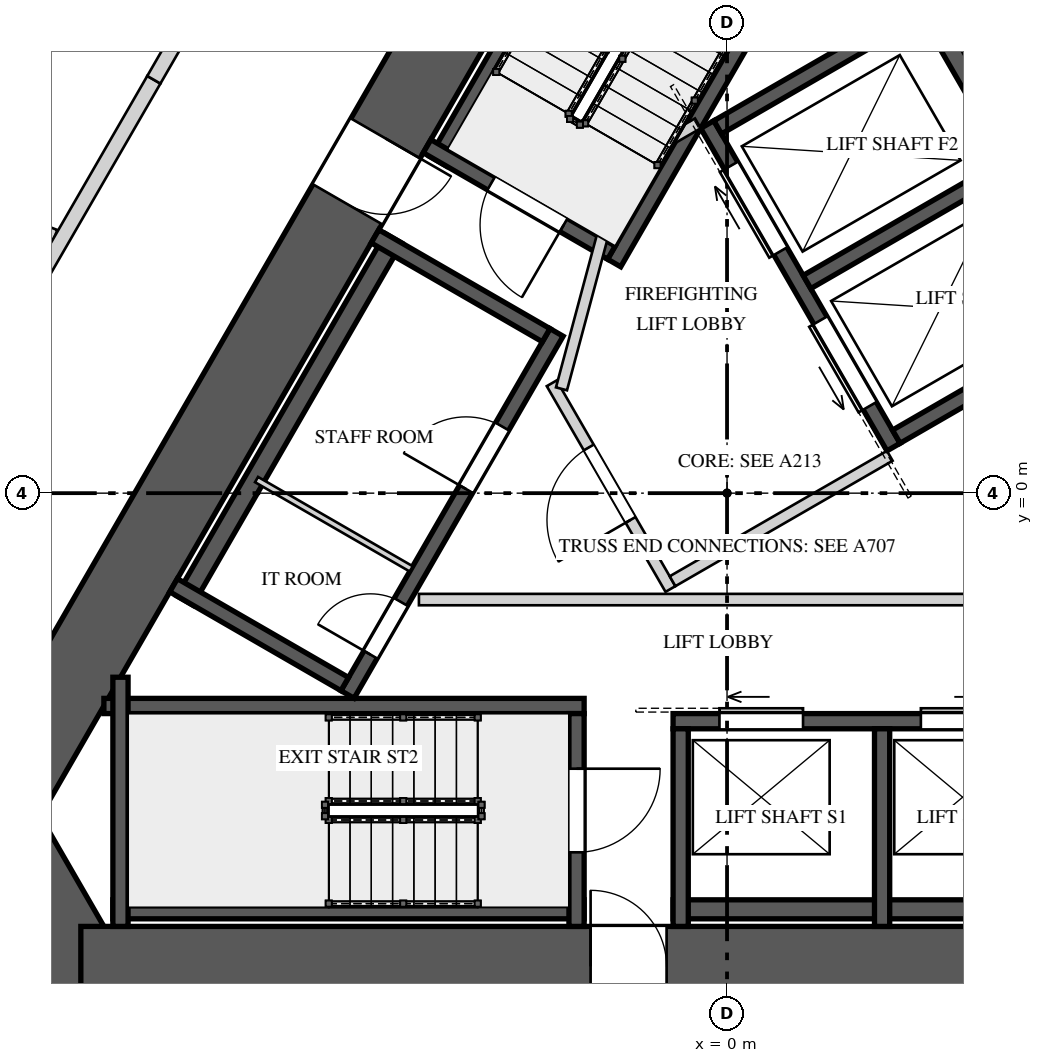
"""IFC4 building model, lengths in metres.
Left out: names, types, materials, properties, quantities, classifications, styles, units other than length and angle.
Written with IfcOpenShell. Run it as: python <this file> out.ifc"""

import sys

from ifc_helpers import new_model, si_unit, direction, frame, frame_2d, origin, place, context, subcontext, project, spatial, rectangle, extrude, element, fill, save


model = new_model("IFC4")
c1 = context("Model", 3, precision=1e-05, world=origin(), true_north=direction((0.0, 1.0)))
c2 = subcontext(c1, "Body", "Model", "MODEL_VIEW")
j1 = project(units=[si_unit("LENGTHUNIT", "METRE"), si_unit("PLANEANGLEUNIT", "RADIAN")], contexts=[c1])
p1 = place(None, origin())
s1 = spatial("IfcSite", under=j1, at=p1, CompositionType="ELEMENT")
p2 = place(p1, origin())
s2 = spatial("IfcBuilding", under=s1, at=p2, CompositionType="ELEMENT")
p3 = place(p2, frame((0.0, 0.0, 83.2)))
s3 = spatial("IfcBuildingStorey", under=s2, at=p3, CompositionType="ELEMENT", Elevation=83.2)
p4 = place(p3, frame((-1.14, 10.475, 0.0), z_axis=(0.0, 0.0, 1.0), x_axis=(-0.499985955615, -0.866033512162, 0.0)))
e1 = element("IfcWall", 1, at=p4, inside=s3, PredefinedType="SHEAR", context=c2, shape_type="SweptSolid", body=[
    extrude(rectangle(XDim=17.003, YDim=1.05, at=frame_2d((8.501, 0.0))), origin(), (0.0, 0.0, 1.0), 5.2),
])
p5 = place(p4, frame((6.707, 0.0, 0.0)))
e2 = element("IfcOpeningElement", 2, at=p5, cuts=e1, PredefinedType="OPENING", context=c2, shape_type="SweptSolid", body=[
    extrude(rectangle(XDim=1.0, YDim=2.4, at=frame_2d((0.5, 1.2))), frame((0.0, 0.535, 0.0), z_axis=(0.0, -1.0, 0.0), x_axis=(1.0, 0.0, 0.0)), (0.0, 0.0, 1.0), 1.07),
])
p6 = place(p3, frame((-9.793, -3.988, 0.0), z_axis=(0.0, 0.0, 1.0), x_axis=(0.499995765644, -0.866027848477, 0.0)))
e3 = element("IfcWall", 3, at=p6, inside=s3, PredefinedType="SHEAR", context=c2, shape_type="SweptSolid", body=[
    extrude(rectangle(XDim=2.887, YDim=1.05, at=frame_2d((1.443, 0.0))), origin(), (0.0, 0.0, 1.0), 5.2),
])
p7 = place(p3, frame((-8.501, -6.225, 0.0), z_axis=(0.0, 0.0, 1.0), x_axis=(1.0, 0.0, 0.0)))
e4 = element("IfcWall", 4, at=p7, inside=s3, PredefinedType="SHEAR", context=c2, shape_type="SweptSolid", body=[
    extrude(rectangle(XDim=17.003, YDim=1.05, at=frame_2d((8.501, 0.0))), origin(), (0.0, 0.0, 1.0), 5.2),
])
p8 = place(p7, frame((6.707, 0.0, 0.0)))
e5 = element("IfcOpeningElement", 5, at=p8, cuts=e4, PredefinedType="OPENING", context=c2, shape_type="SweptSolid", body=[
    extrude(rectangle(XDim=1.0, YDim=2.4, at=frame_2d((0.5, 1.2))), frame((0.0, 0.535, 0.0), z_axis=(0.0, -1.0, 0.0), x_axis=(1.0, 0.0, 0.0)), (0.0, 0.0, 1.0), 1.07),
])
p9 = place(p7, frame((14.472, 0.0, 0.0)))
e6 = element("IfcOpeningElement", 6, at=p9, cuts=e4, PredefinedType="OPENING", context=c2, shape_type="SweptSolid", body=[
    extrude(rectangle(XDim=0.8, YDim=2.1, at=frame_2d((0.4, 1.05))), frame((0.0, 0.535, 0.0), z_axis=(0.0, -1.0, 0.0), x_axis=(1.0, 0.0, 0.0)), (0.0, 0.0, 1.0), 1.07),
])
p10 = place(p3, frame((9.642, -4.25, 0.0), z_axis=(0.0, 0.0, 1.0), x_axis=(-0.499985955615, 0.866033512162, 0.0)))
e7 = element("IfcWall", 7, at=p10, inside=s3, PredefinedType="SHEAR", context=c2, shape_type="SweptSolid", body=[
    extrude(rectangle(XDim=17.003, YDim=1.05, at=frame_2d((8.501, 0.0))), origin(), (0.0, 0.0, 1.0), 5.2),
])
p11 = place(p10, frame((6.776, 0.0, 0.0)))
e8 = element("IfcOpeningElement", 8, at=p11, cuts=e7, PredefinedType="OPENING", context=c2, shape_type="SweptSolid", body=[
    extrude(rectangle(XDim=1.0, YDim=2.4, at=frame_2d((0.5, 1.2))), frame((0.0, 0.535, 0.0), z_axis=(0.0, -1.0, 0.0), x_axis=(1.0, 0.0, 0.0)), (0.0, 0.0, 1.0), 1.07),
])
p12 = place(p10, frame((13.967, 0.0, 0.0)))
e9 = element("IfcOpeningElement", 9, at=p12, cuts=e7, PredefinedType="OPENING", context=c2, shape_type="SweptSolid", body=[
    extrude(rectangle(XDim=0.8, YDim=2.1, at=frame_2d((0.4, 1.05))), frame((0.0, 0.535, 0.0), z_axis=(0.0, -1.0, 0.0), x_axis=(1.0, 0.0, 0.0)), (0.0, 0.0, 1.0), 1.07),
])
p13 = place(p3, frame((-0.701, 9.735, 0.0), z_axis=(0.0, 0.0, 1.0), x_axis=(-0.500026960575, -0.86600983753, 0.0)))
e10 = element("IfcWall", 10, at=p13, inside=s3, PredefinedType="SOLIDWALL", context=c2, shape_type="SweptSolid", body=[
    extrude(rectangle(XDim=6.2, YDim=0.25, at=frame_2d((3.1, 0.0))), origin(), (0.0, 0.0, 1.0), 4.85),
])
p14 = place(p3, frame((1.674, 8.5, 0.0), z_axis=(0.0, 0.0, 1.0), x_axis=(-0.499995607161, -0.866027939976, 0.0)))
e11 = element("IfcWall", 11, at=p14, inside=s3, PredefinedType="SOLIDWALL", context=c2, shape_type="SweptSolid", body=[
    extrude(rectangle(XDim=6.318, YDim=0.2, at=frame_2d((3.159, 0.0))), origin(), (0.0, 0.0, 1.0), 4.85),
])
p15 = place(p3, frame((-1.521, 3.165, 0.0), z_axis=(0.0, 0.0, 1.0), x_axis=(-0.866034573852, 0.49998411664, 0.0)))
e12 = element("IfcWall", 12, at=p15, inside=s3, PredefinedType="SOLIDWALL", context=c2, shape_type="SweptSolid", body=[
    extrude(rectangle(XDim=2.8, YDim=0.2, at=frame_2d((1.4, 0.0))), origin(), (0.0, 0.0, 1.0), 4.85),
])
p16 = place(p15, frame((0.725, 0.0, 0.0)))
e13 = element("IfcOpeningElement", 13, at=p16, cuts=e12, PredefinedType="OPENING", context=c2, shape_type="SweptSolid", body=[
    extrude(rectangle(XDim=1.1, YDim=2.4, at=frame_2d((0.55, 1.2))), frame((0.0, 0.11, 0.0), z_axis=(0.0, -1.0, 0.0), x_axis=(1.0, 0.0, 0.0)), (0.0, 0.0, 1.0), 0.22),
])
p17 = place(p3, frame((-8.08, -5.475, 0.0), z_axis=(0.0, 0.0, 1.0), x_axis=(1.0, 0.0, 0.0)))
e14 = element("IfcWall", 14, at=p17, inside=s3, PredefinedType="SOLIDWALL", context=c2, shape_type="SweptSolid", body=[
    extrude(rectangle(XDim=6.2, YDim=0.25, at=frame_2d((3.1, 0.0))), origin(), (0.0, 0.0, 1.0), 4.85),
])
p18 = place(p3, frame((-8.198, -2.8, 0.0), z_axis=(0.0, 0.0, 1.0), x_axis=(1.0, 0.0, 0.0)))
e15 = element("IfcWall", 15, at=p18, inside=s3, PredefinedType="SOLIDWALL", context=c2, shape_type="SweptSolid", body=[
    extrude(rectangle(XDim=6.319, YDim=0.2, at=frame_2d((3.159, 0.0))), origin(), (0.0, 0.0, 1.0), 4.85),
])
p19 = place(p3, frame((-7.98, -2.422, 0.0), z_axis=(0.0, 0.0, 1.0), x_axis=(0.0, -1.0, 0.0)))
e16 = element("IfcWall", 16, at=p19, inside=s3, PredefinedType="SOLIDWALL", context=c2, shape_type="SweptSolid", body=[
    extrude(rectangle(XDim=3.278, YDim=0.2, at=frame_2d((1.639, 0.0))), origin(), (0.0, 0.0, 1.0), 4.85),
])
p20 = place(p3, frame((-1.98, -2.9, 0.0), z_axis=(0.0, 0.0, 1.0), x_axis=(0.0, -1.0, 0.0)))
e17 = element("IfcWall", 17, at=p20, inside=s3, PredefinedType="SOLIDWALL", context=c2, shape_type="SweptSolid", body=[
    extrude(rectangle(XDim=2.8, YDim=0.2, at=frame_2d((1.4, 0.0))), origin(), (0.0, 0.0, 1.0), 4.85),
])
p21 = place(p20, frame((0.725, 0.0, 0.0)))
e18 = element("IfcOpeningElement", 18, at=p21, cuts=e17, PredefinedType="OPENING", context=c2, shape_type="SweptSolid", body=[
    extrude(rectangle(XDim=1.1, YDim=2.4, at=frame_2d((0.55, 1.2))), frame((0.0, 0.11, 0.0), z_axis=(0.0, -1.0, 0.0), x_axis=(1.0, 0.0, 0.0)), (0.0, 0.0, 1.0), 0.22),
])
p22 = place(p3, frame((-4.993, -2.648, 0.0), z_axis=(0.0, 0.0, 1.0), x_axis=(0.499996545922, 0.866027397988, 0.0)))
e19 = element("IfcWall", 19, at=p22, inside=s3, PredefinedType="SOLIDWALL", context=c2, shape_type="SweptSolid", body=[
    extrude(rectangle(XDim=5.5, YDim=0.2, at=frame_2d((2.75, 0.0))), origin(), (0.0, 0.0, 1.0), 4.85),
])
p23 = place(p22, frame((3.12, 0.0, 0.0)))
e20 = element("IfcOpeningElement", 20, at=p23, cuts=e19, PredefinedType="OPENING", context=c2, shape_type="SweptSolid", body=[
    extrude(rectangle(XDim=0.95, YDim=2.4, at=frame_2d((0.475, 1.2))), frame((0.0, 0.11, 0.0), z_axis=(0.0, -1.0, 0.0), x_axis=(1.0, 0.0, 0.0)), (0.0, 0.0, 1.0), 0.22),
])
p24 = place(p22, frame((0.605, 0.0, 0.0)))
e21 = element("IfcOpeningElement", 21, at=p24, cuts=e19, PredefinedType="OPENING", context=c2, shape_type="SweptSolid", body=[
    extrude(rectangle(XDim=0.8, YDim=2.1, at=frame_2d((0.4, 1.05))), frame((0.0, 0.11, 0.0), z_axis=(0.0, -1.0, 0.0), x_axis=(1.0, 0.0, 0.0)), (0.0, 0.0, 1.0), 0.22),
])
p25 = place(p3, frame((-4.386, 3.352, 0.0), z_axis=(0.0, 0.0, 1.0), x_axis=(-0.500015767406, -0.866016300277, 0.0)))
e22 = element("IfcWall", 22, at=p25, inside=s3, PredefinedType="SOLIDWALL", context=c2, shape_type="SweptSolid", body=[
    extrude(rectangle(XDim=5.5, YDim=0.25, at=frame_2d((2.75, 0.0))), origin(), (0.0, 0.0, 1.0), 4.85),
])
for number, where, z_axis, x_axis in (
    (23, (-2.38, 2.078, 0.0), (0.0, 0.0, 1.0), (-0.866, 0.5, 0.0)),
    (24, (-5.03, -2.512, 0.0), (0.0, 0.0, 1.0), (-0.866, 0.5, 0.0)),
):
    element("IfcWall", number, at=place(p3, frame(where, z_axis=z_axis, x_axis=x_axis)), inside=s3, PredefinedType="SOLIDWALL", context=c2, shape_type="SweptSolid", body=[
        extrude(rectangle(XDim=2.6, YDim=0.2, at=frame_2d((1.3, 0.0))), origin(), (0.0, 0.0, 1.0), 4.85),
    ])
p26 = place(p3, frame((-4.155, -0.996, 0.0), z_axis=(0.0, 0.0, 1.0), x_axis=(-0.866016039709, 0.500016218704, 0.0)))
e25 = element("IfcWall", 25, at=p26, inside=s3, PredefinedType="PARTITIONING", context=c2, shape_type="SweptSolid", body=[
    extrude(rectangle(XDim=2.35, YDim=0.08, at=frame_2d((1.175, 0.0))), origin(), (0.0, 0.0, 1.0), 4.85),
])
p27 = place(p3, frame((-0.71, -3.0, 0.0), z_axis=(0.0, 0.0, 1.0), x_axis=(1.0, 0.0, 0.0)))
e26 = element("IfcWall", 26, at=p27, inside=s3, PredefinedType="SOLIDWALL", context=c2, shape_type="SweptSolid", body=[
    extrude(rectangle(XDim=5.5, YDim=0.2, at=frame_2d((2.75, 0.0))), origin(), (0.0, 0.0, 1.0), 4.85),
])
p28 = place(p27, frame((0.61, 0.0, 0.0)))
e27 = element("IfcOpeningElement", 27, at=p28, cuts=e26, PredefinedType="OPENING", context=c2, shape_type="SweptSolid", body=[
    extrude(rectangle(XDim=1.1, YDim=2.1, at=frame_2d((0.55, 1.05))), frame((0.0, 0.11, 0.0), z_axis=(0.0, -1.0, 0.0), x_axis=(1.0, 0.0, 0.0)), (0.0, 0.0, 1.0), 0.22),
])
p29 = place(p27, frame((3.26, 0.0, 0.0)))
e28 = element("IfcOpeningElement", 28, at=p29, cuts=e26, PredefinedType="OPENING", context=c2, shape_type="SweptSolid", body=[
    extrude(rectangle(XDim=1.1, YDim=2.1, at=frame_2d((0.55, 1.05))), frame((0.0, 0.11, 0.0), z_axis=(0.0, -1.0, 0.0), x_axis=(1.0, 0.0, 0.0)), (0.0, 0.0, 1.0), 0.22),
])
p30 = place(p3, frame((-0.71, -5.475, 0.0), z_axis=(0.0, 0.0, 1.0), x_axis=(1.0, 0.0, 0.0)))
e29 = element("IfcWall", 29, at=p30, inside=s3, PredefinedType="SOLIDWALL", context=c2, shape_type="SweptSolid", body=[
    extrude(rectangle(XDim=5.5, YDim=0.25, at=frame_2d((2.75, 0.0))), origin(), (0.0, 0.0, 1.0), 4.85),
])
for number, where, z_axis, x_axis in (
    (30, (-0.61, -3.1, 0.0), (0.0, 0.0, 1.0), (0.0, -1.0, 0.0)),
    (31, (2.04, -3.1, 0.0), (0.0, 0.0, 1.0), (0.0, -1.0, 0.0)),
):
    element("IfcWall", number, at=place(p3, frame(where, z_axis=z_axis, x_axis=x_axis)), inside=s3, PredefinedType="SOLIDWALL", context=c2, shape_type="SweptSolid", body=[
        extrude(rectangle(XDim=2.6, YDim=0.2, at=frame_2d((1.3, 0.0))), origin(), (0.0, 0.0, 1.0), 4.85),
    ])
p31 = place(p3, frame((2.19, 0.606, 0.0), z_axis=(0.0, 0.0, 1.0), x_axis=(-0.500002801628, 0.866023786258, 0.0)))
e32 = element("IfcWall", 32, at=p31, inside=s3, PredefinedType="SOLIDWALL", context=c2, shape_type="SweptSolid", body=[
    extrude(rectangle(XDim=4.9, YDim=0.2, at=frame_2d((2.45, 0.0))), origin(), (0.0, 0.0, 1.0), 4.85),
])
p32 = place(p31, frame((0.625, 0.0, 0.0)))
e33 = element("IfcOpeningElement", 33, at=p32, cuts=e32, PredefinedType="OPENING", context=c2, shape_type="SweptSolid", body=[
    extrude(rectangle(XDim=1.3, YDim=2.1, at=frame_2d((0.65, 1.05))), frame((0.0, 0.11, 0.0), z_axis=(0.0, -1.0, 0.0), x_axis=(1.0, 0.0, 0.0)), (0.0, 0.0, 1.0), 0.22),
])
p33 = place(p31, frame((2.975, 0.0, 0.0)))
e34 = element("IfcOpeningElement", 34, at=p33, cuts=e32, PredefinedType="OPENING", context=c2, shape_type="SweptSolid", body=[
    extrude(rectangle(XDim=1.3, YDim=2.1, at=frame_2d((0.65, 1.05))), frame((0.0, 0.11, 0.0), z_axis=(0.0, -1.0, 0.0), x_axis=(1.0, 0.0, 0.0)), (0.0, 0.0, 1.0), 0.22),
])
p34 = place(p3, frame((5.026, 2.244, 0.0), z_axis=(0.0, 0.0, 1.0), x_axis=(-0.500002801628, 0.866023786258, 0.0)))
e35 = element("IfcWall", 35, at=p34, inside=s3, PredefinedType="SOLIDWALL", context=c2, shape_type="SweptSolid", body=[
    extrude(rectangle(XDim=4.9, YDim=0.25, at=frame_2d((2.45, 0.0))), origin(), (0.0, 0.0, 1.0), 4.85),
])
for number, where, z_axis, x_axis in (
    (36, (2.227, 0.743, 0.0), (0.0, 0.0, 1.0), (0.866, 0.5, 0.0)),
    (37, (1.052, 2.778, 0.0), (0.0, 0.0, 1.0), (0.866, 0.5, 0.0)),
):
    element("IfcWall", number, at=place(p3, frame(where, z_axis=z_axis, x_axis=x_axis)), inside=s3, PredefinedType="SOLIDWALL", context=c2, shape_type="SweptSolid", body=[
        extrude(rectangle(XDim=3.4, YDim=0.2, at=frame_2d((1.7, 0.0))), origin(), (0.0, 0.0, 1.0), 4.85),
    ])
p35 = place(p3, frame((-0.123, 4.813, 0.0), z_axis=(0.0, 0.0, 1.0), x_axis=(0.866020560687, 0.500008388397, 0.0)))
e38 = element("IfcWall", 38, at=p35, inside=s3, PredefinedType="SOLIDWALL", context=c2, shape_type="SweptSolid", body=[
    extrude(rectangle(XDim=3.4, YDim=0.2, at=frame_2d((1.7, 0.0))), origin(), (0.0, 0.0, 1.0), 4.85),
])
p36 = place(p3, frame((-0.744, -1.261, 0.0), z_axis=(0.0, 0.0, 1.0), x_axis=(-0.500004234368, 0.866022959057, 0.0)))
e39 = element("IfcWall", 39, at=p36, inside=s3, PredefinedType="PARTITIONING", context=c2, shape_type="SweptSolid", body=[
    extrude(rectangle(XDim=3.125, YDim=0.15, at=frame_2d((1.562, 0.0))), origin(), (0.0, 0.0, 1.0), 4.85),
])
p37 = place(p36, frame((1.05, 0.0, 0.0)))
e40 = element("IfcOpeningElement", 40, at=p37, cuts=e39, PredefinedType="OPENING", context=c2, shape_type="SweptSolid", body=[
    extrude(rectangle(XDim=1.1, YDim=2.4, at=frame_2d((0.55, 1.2))), frame((0.0, 0.085, 0.0), z_axis=(0.0, -1.0, 0.0), x_axis=(1.0, 0.0, 0.0)), (0.0, 0.0, 1.0), 0.17),
])
p38 = place(p3, frame((-0.717, -1.159, 0.0), z_axis=(0.0, 0.0, 1.0), x_axis=(0.866008176907, 0.50002983664, 0.0)))
e41 = element("IfcWall", 41, at=p38, inside=s3, PredefinedType="PARTITIONING", context=c2, shape_type="SweptSolid", body=[
    extrude(rectangle(XDim=3.3, YDim=0.15, at=frame_2d((1.65, 0.0))), origin(), (0.0, 0.0, 1.0), 4.85),
])
p39 = place(p3, frame((-2.178, 1.372, 0.0), z_axis=(0.0, 0.0, 1.0), x_axis=(0.258808958833, 0.96592852884, 0.0)))
e42 = element("IfcWall", 42, at=p39, inside=s3, PredefinedType="PARTITIONING", context=c2, shape_type="SweptSolid", body=[
    extrude(rectangle(XDim=2.903, YDim=0.15, at=frame_2d((1.451, 0.0))), origin(), (0.0, 0.0, 1.0), 4.85),
])
p40 = place(p3, frame((-1.51, 4.215, 0.0), z_axis=(0.0, 0.0, 1.0), x_axis=(0.866085525409, 0.49989585183, 0.0)))
e43 = element("IfcWall", 43, at=p40, inside=s3, PredefinedType="PARTITIONING", context=c2, shape_type="SweptSolid", body=[
    extrude(rectangle(XDim=1.3, YDim=0.15, at=frame_2d((0.65, 0.0))), origin(), (0.0, 0.0, 1.0), 4.85),
])
p41 = place(p3, frame((-4.053, -1.4, 0.0), z_axis=(0.0, 0.0, 1.0), x_axis=(1.0, 0.0, 0.0)))
e44 = element("IfcWall", 44, at=p41, inside=s3, PredefinedType="PARTITIONING", context=c2, shape_type="SweptSolid", body=[
    extrude(rectangle(XDim=7.876, YDim=0.15, at=frame_2d((3.938, 0.0))), origin(), (0.0, 0.0, 1.0), 4.85),
])
p42 = place(p3, frame((-8.838, 3.393, 0.0), z_axis=(0.0, 0.0, 1.0), x_axis=(-0.933579605878, 0.358370087324, 0.0)))
e45 = element("IfcWall", 45, at=p42, inside=s3, PredefinedType="PARTITIONING", context=c2, shape_type="SweptSolid", body=[
    extrude(rectangle(XDim=8.033, YDim=0.15, at=frame_2d((4.017, 0.0))), origin(), (0.0, 0.0, 1.0), 4.85),
])
p43 = place(p3, frame((-9.33, 2.341, 0.0), z_axis=(0.0, 0.0, 1.0), x_axis=(0.500029679218, 0.866008267802, 0.0)))
e46 = element("IfcWall", 46, at=p43, inside=s3, PredefinedType="SOLIDWALL", context=c2, shape_type="SweptSolid", body=[
    extrude(rectangle(XDim=3.577, YDim=0.2, at=frame_2d((1.789, 0.0))), origin(), (0.0, 0.0, 1.0), 4.85),
])
p44 = place(p3, frame((-7.541, 5.438, 0.0), z_axis=(0.0, 0.0, 1.0), x_axis=(0.499809598504, 0.866135304236, 0.0)))
e47 = element("IfcWall", 47, at=p44, inside=s3, PredefinedType="SOLIDWALL", context=c2, shape_type="SweptSolid", body=[
    extrude(rectangle(XDim=0.808, YDim=0.2, at=frame_2d((0.404, 0.0))), origin(), (0.0, 0.0, 1.0), 3.95),
])
p45 = place(p16, origin())
e48 = element("IfcDoor", 48, at=p45, inside=s3, OperationType="SINGLE_SWING_RIGHT", PredefinedType="DOOR", context=c2, shape_type="SweptSolid", body=[
    extrude(rectangle(XDim=1.1, YDim=2.4, at=frame_2d((0.55, 1.2))), frame((0.0, 0.025, 0.0), z_axis=(0.0, -1.0, 0.0), x_axis=(1.0, 0.0, 0.0)), (0.0, 0.0, 1.0), 0.05),
])
fill(e13, e48)
p46 = place(p21, origin())
e49 = element("IfcDoor", 49, at=p46, inside=s3, OperationType="SINGLE_SWING_LEFT", PredefinedType="DOOR", context=c2, shape_type="SweptSolid", body=[
    extrude(rectangle(XDim=1.1, YDim=2.4, at=frame_2d((0.55, 1.2))), frame((0.0, 0.025, 0.0), z_axis=(0.0, -1.0, 0.0), x_axis=(1.0, 0.0, 0.0)), (0.0, 0.0, 1.0), 0.05),
])
fill(e18, e49)
p47 = place(p23, origin())
e50 = element("IfcDoor", 50, at=p47, inside=s3, OperationType="SINGLE_SWING_LEFT", PredefinedType="DOOR", context=c2, shape_type="SweptSolid", body=[
    extrude(rectangle(XDim=0.95, YDim=2.4, at=frame_2d((0.475, 1.2))), frame((0.0, 0.025, 0.0), z_axis=(0.0, -1.0, 0.0), x_axis=(1.0, 0.0, 0.0)), (0.0, 0.0, 1.0), 0.05),
])
fill(e20, e50)
p48 = place(p24, origin())
e51 = element("IfcDoor", 51, at=p48, inside=s3, OperationType="SINGLE_SWING_RIGHT", PredefinedType="DOOR", context=c2, shape_type="SweptSolid", body=[
    extrude(rectangle(XDim=0.8, YDim=2.1, at=frame_2d((0.4, 1.05))), frame((0.0, 0.025, 0.0), z_axis=(0.0, -1.0, 0.0), x_axis=(1.0, 0.0, 0.0)), (0.0, 0.0, 1.0), 0.05),
])
fill(e21, e51)
p49 = place(p28, origin())
e52 = element("IfcDoor", 52, at=p49, inside=s3, OperationType="SLIDING_TO_LEFT", PredefinedType="DOOR", context=c2, shape_type="SweptSolid", body=[
    extrude(rectangle(XDim=1.1, YDim=2.1, at=frame_2d((0.55, 1.05))), frame((0.0, 0.025, 0.0), z_axis=(0.0, -1.0, 0.0), x_axis=(1.0, 0.0, 0.0)), (0.0, 0.0, 1.0), 0.05),
])
fill(e27, e52)
p50 = place(p29, origin())
e53 = element("IfcDoor", 53, at=p50, inside=s3, OperationType="SLIDING_TO_RIGHT", PredefinedType="DOOR", context=c2, shape_type="SweptSolid", body=[
    extrude(rectangle(XDim=1.1, YDim=2.1, at=frame_2d((0.55, 1.05))), frame((0.0, 0.025, 0.0), z_axis=(0.0, -1.0, 0.0), x_axis=(1.0, 0.0, 0.0)), (0.0, 0.0, 1.0), 0.05),
])
fill(e28, e53)
p51 = place(p32, origin())
e54 = element("IfcDoor", 54, at=p51, inside=s3, OperationType="SLIDING_TO_LEFT", PredefinedType="DOOR", context=c2, shape_type="SweptSolid", body=[
    extrude(rectangle(XDim=1.3, YDim=2.1, at=frame_2d((0.65, 1.05))), frame((0.0, 0.025, 0.0), z_axis=(0.0, -1.0, 0.0), x_axis=(1.0, 0.0, 0.0)), (0.0, 0.0, 1.0), 0.05),
])
fill(e33, e54)
p52 = place(p33, origin())
e55 = element("IfcDoor", 55, at=p52, inside=s3, OperationType="SLIDING_TO_RIGHT", PredefinedType="DOOR", context=c2, shape_type="SweptSolid", body=[
    extrude(rectangle(XDim=1.3, YDim=2.1, at=frame_2d((0.65, 1.05))), frame((0.0, 0.025, 0.0), z_axis=(0.0, -1.0, 0.0), x_axis=(1.0, 0.0, 0.0)), (0.0, 0.0, 1.0), 0.05),
])
fill(e34, e55)
p53 = place(p37, origin())
e56 = element("IfcDoor", 56, at=p53, inside=s3, OperationType="SINGLE_SWING_LEFT", PredefinedType="DOOR", context=c2, shape_type="SweptSolid", body=[
    extrude(rectangle(XDim=1.1, YDim=2.4, at=frame_2d((0.55, 1.2))), frame((0.0, 0.025, 0.0), z_axis=(0.0, -1.0, 0.0), x_axis=(1.0, 0.0, 0.0)), (0.0, 0.0, 1.0), 0.05),
])
fill(e40, e56)
p54 = place(p5, origin())
e57 = element("IfcDoor", 57, at=p54, inside=s3, OperationType="SINGLE_SWING_RIGHT", PredefinedType="DOOR", context=c2, shape_type="SweptSolid", body=[
    extrude(rectangle(XDim=1.0, YDim=2.4, at=frame_2d((0.5, 1.2))), frame((0.0, 0.025, 0.0), z_axis=(0.0, -1.0, 0.0), x_axis=(1.0, 0.0, 0.0)), (0.0, 0.0, 1.0), 0.05),
])
fill(e2, e57)
p55 = place(p8, origin())
e58 = element("IfcDoor", 58, at=p55, inside=s3, OperationType="SINGLE_SWING_LEFT", PredefinedType="DOOR", context=c2, shape_type="SweptSolid", body=[
    extrude(rectangle(XDim=1.0, YDim=2.4, at=frame_2d((0.5, 1.2))), frame((0.0, 0.025, 0.0), z_axis=(0.0, -1.0, 0.0), x_axis=(1.0, 0.0, 0.0)), (0.0, 0.0, 1.0), 0.05),
])
fill(e5, e58)
save(model, sys.argv[1])
